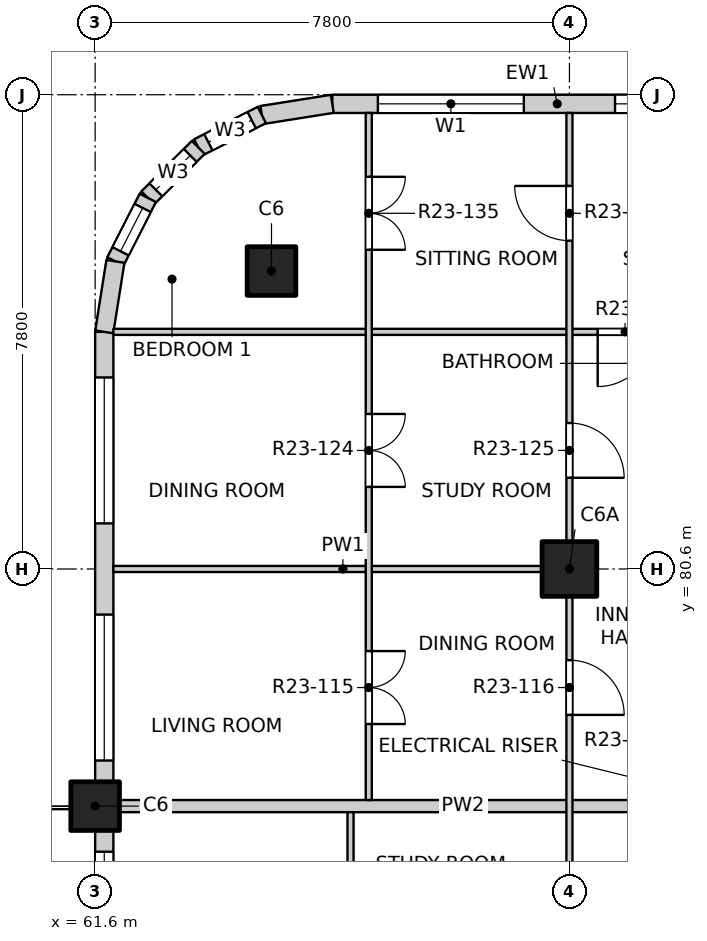
"""IFC4 building model, lengths in metres.
Left out: names, types, materials, properties, quantities, classifications, styles, units other than length and angle.
Written with IfcOpenShell. Run it as: python <this file> out.ifc"""

import sys

from ifc_helpers import new_model, si_unit, direction, frame, frame_2d, origin, origin_2d, place, context, subcontext, project, spatial, rectangle, extrude, element, fill, save


model = new_model("IFC4")
c1 = context("Model", 3, precision=1e-05, world=origin(), true_north=direction((0.0, 1.0)))
c2 = subcontext(c1, "Body", "Model", "MODEL_VIEW")
j1 = project(units=[si_unit("LENGTHUNIT", "METRE"), si_unit("PLANEANGLEUNIT", "RADIAN")], contexts=[c1])
p1 = place(None, origin())
s1 = spatial("IfcSite", under=j1, at=p1, CompositionType="ELEMENT")
p2 = place(p1, origin())
s2 = spatial("IfcBuilding", under=s1, at=p2, CompositionType="ELEMENT")
p3 = place(p2, frame((0.0, 0.0, 238.1)))
s3 = spatial("IfcBuildingStorey", under=s2, at=p3, CompositionType="ELEMENT", Elevation=238.1)
for number, where, z_axis, x_axis in (
    (1, (64.5, 85.5, -0.25), (0.0, 0.0, 1.0), (1.0, 0.0, 0.0)),
    (2, (61.6, 76.7, -0.25), (0.0, 0.0, 1.0), (1.0, 0.0, 0.0)),
):
    element("IfcColumn", number, at=place(p3, frame(where, z_axis=z_axis, x_axis=x_axis)), inside=s3, PredefinedType="COLUMN", context=c2, shape_type="SweptSolid", body=[
        extrude(rectangle(XDim=0.8, YDim=0.8, at=origin_2d()), origin(), (0.0, 0.0, 1.0), 3.35),
    ])
p4 = place(p3, frame((69.4, 80.6, -0.25), z_axis=(0.0, 0.0, 1.0), x_axis=(1.0, 0.0, 0.0)))
e3 = element("IfcColumn", 3, at=p4, inside=s3, PredefinedType="COLUMN", context=c2, shape_type="SweptSolid", body=[
    extrude(rectangle(XDim=0.9, YDim=0.9, at=origin_2d()), origin(), (0.0, 0.0, 1.0), 3.35),
])
p5 = place(p3, frame((65.5, 88.25, 0.0), z_axis=(0.0, 0.0, 1.0), x_axis=(1.0, 0.0, 0.0)))
e4 = element("IfcWall", 4, at=p5, inside=s3, PredefinedType="SOLIDWALL", context=c2, shape_type="SweptSolid", body=[
    extrude(rectangle(XDim=7.4, YDim=0.3, at=frame_2d((3.7, 0.0))), origin(), (0.0, 0.0, 1.0), 3.1),
])
p6 = place(p5, frame((0.75, 0.0, 0.9)))
e5 = element("IfcOpeningElement", 5, at=p6, cuts=e4, PredefinedType="OPENING", context=c2, shape_type="SweptSolid", body=[
    extrude(rectangle(XDim=2.4, YDim=1.8, at=frame_2d((1.2, 0.9))), frame((0.0, 0.16, 0.0), z_axis=(0.0, -1.0, 0.0), x_axis=(1.0, 0.0, 0.0)), (0.0, 0.0, 1.0), 0.32),
])
p7 = place(p5, frame((4.65, 0.0, 0.9)))
e6 = element("IfcOpeningElement", 6, at=p7, cuts=e4, PredefinedType="OPENING", context=c2, shape_type="SweptSolid", body=[
    extrude(rectangle(XDim=2.4, YDim=1.8, at=frame_2d((1.2, 0.9))), frame((0.0, 0.16, 0.0), z_axis=(0.0, -1.0, 0.0), x_axis=(1.0, 0.0, 0.0)), (0.0, 0.0, 1.0), 0.32),
])
p8 = place(p3, frame((61.75, 69.3, 0.0), z_axis=(0.0, 0.0, 1.0), x_axis=(0.0, 1.0, 0.0)))
e7 = element("IfcWall", 7, at=p8, inside=s3, PredefinedType="SOLIDWALL", context=c2, shape_type="SweptSolid", body=[
    extrude(rectangle(XDim=7.0, YDim=0.3, at=frame_2d((3.5, 0.0))), origin(), (0.0, 0.0, 1.0), 3.1),
])
p9 = place(p8, frame((0.65, 0.0, 0.0)))
e8 = element("IfcOpeningElement", 8, at=p9, cuts=e7, PredefinedType="OPENING", context=c2, shape_type="SweptSolid", body=[
    extrude(rectangle(XDim=1.8, YDim=2.4, at=frame_2d((0.9, 1.2))), frame((0.0, 0.16, 0.0), z_axis=(0.0, -1.0, 0.0), x_axis=(1.0, 0.0, 0.0)), (0.0, 0.0, 1.0), 0.32),
])
p10 = place(p8, frame((4.25, 0.0, 0.9)))
e9 = element("IfcOpeningElement", 9, at=p10, cuts=e7, PredefinedType="OPENING", context=c2, shape_type="SweptSolid", body=[
    extrude(rectangle(XDim=2.4, YDim=1.8, at=frame_2d((1.2, 0.9))), frame((0.0, 0.16, 0.0), z_axis=(0.0, -1.0, 0.0), x_axis=(1.0, 0.0, 0.0)), (0.0, 0.0, 1.0), 0.32),
])
p11 = place(p3, frame((61.75, 77.1, 0.0), z_axis=(0.0, 0.0, 1.0), x_axis=(0.0, 1.0, 0.0)))
e10 = element("IfcWall", 10, at=p11, inside=s3, PredefinedType="SOLIDWALL", context=c2, shape_type="SweptSolid", body=[
    extrude(rectangle(XDim=7.4, YDim=0.3, at=frame_2d((3.7, 0.0))), origin(), (0.0, 0.0, 1.0), 3.1),
])
p12 = place(p11, frame((0.35, 0.0, 0.9)))
e11 = element("IfcOpeningElement", 11, at=p12, cuts=e10, PredefinedType="OPENING", context=c2, shape_type="SweptSolid", body=[
    extrude(rectangle(XDim=2.4, YDim=1.8, at=frame_2d((1.2, 0.9))), frame((0.0, 0.16, 0.0), z_axis=(0.0, -1.0, 0.0), x_axis=(1.0, 0.0, 0.0)), (0.0, 0.0, 1.0), 0.32),
])
p13 = place(p11, frame((4.25, 0.0, 0.9)))
e12 = element("IfcOpeningElement", 12, at=p13, cuts=e10, PredefinedType="OPENING", context=c2, shape_type="SweptSolid", body=[
    extrude(rectangle(XDim=2.4, YDim=1.8, at=frame_2d((1.2, 0.9))), frame((0.0, 0.16, 0.0), z_axis=(0.0, -1.0, 0.0), x_axis=(1.0, 0.0, 0.0)), (0.0, 0.0, 1.0), 0.32),
])
p14 = place(p3, frame((65.5, 88.25, 0.0), z_axis=(0.0, 0.0, 1.0), x_axis=(-0.987678452879, -0.156496880861, 0.0)))
e13 = element("IfcWall", 13, at=p14, inside=s3, PredefinedType="SOLIDWALL", context=c2, shape_type="SweptSolid", body=[
    extrude(rectangle(XDim=1.173, YDim=0.3, at=frame_2d((0.586, 0.0))), origin(), (0.0, 0.0, 1.0), 3.1),
])
p15 = place(p3, frame((64.341, 88.066, 0.0), z_axis=(0.0, 0.0, 1.0), x_axis=(-0.890988677504, -0.454025524128, 0.0)))
e14 = element("IfcWall", 14, at=p15, inside=s3, PredefinedType="SOLIDWALL", context=c2, shape_type="SweptSolid", body=[
    extrude(rectangle(XDim=1.173, YDim=0.3, at=frame_2d((0.587, 0.0))), origin(), (0.0, 0.0, 1.0), 3.1),
])
p16 = place(p15, frame((0.187, 0.0, 0.9)))
e15 = element("IfcOpeningElement", 15, at=p16, cuts=e14, PredefinedType="OPENING", context=c2, shape_type="SweptSolid", body=[
    extrude(rectangle(XDim=0.8, YDim=1.2, at=frame_2d((0.4, 0.6))), frame((0.0, 0.16, 0.0), z_axis=(0.0, -1.0, 0.0), x_axis=(1.0, 0.0, 0.0)), (0.0, 0.0, 1.0), 0.32),
])
p17 = place(p3, frame((63.296, 87.534, 0.0), z_axis=(0.0, 0.0, 1.0), x_axis=(-0.707106781187, -0.707106781187, 0.0)))
e16 = element("IfcWall", 16, at=p17, inside=s3, PredefinedType="SOLIDWALL", context=c2, shape_type="SweptSolid", body=[
    extrude(rectangle(XDim=1.173, YDim=0.3, at=frame_2d((0.586, 0.0))), origin(), (0.0, 0.0, 1.0), 3.1),
])
p18 = place(p17, frame((0.187, 0.0, 0.9)))
e17 = element("IfcOpeningElement", 17, at=p18, cuts=e16, PredefinedType="OPENING", context=c2, shape_type="SweptSolid", body=[
    extrude(rectangle(XDim=0.8, YDim=1.2, at=frame_2d((0.4, 0.6))), frame((0.0, 0.16, 0.0), z_axis=(0.0, -1.0, 0.0), x_axis=(1.0, 0.0, 0.0)), (0.0, 0.0, 1.0), 0.32),
])
p19 = place(p3, frame((62.466, 86.704, 0.0), z_axis=(0.0, 0.0, 1.0), x_axis=(-0.454025524128, -0.890988677504, 0.0)))
e18 = element("IfcWall", 18, at=p19, inside=s3, PredefinedType="SOLIDWALL", context=c2, shape_type="SweptSolid", body=[
    extrude(rectangle(XDim=1.173, YDim=0.3, at=frame_2d((0.587, 0.0))), origin(), (0.0, 0.0, 1.0), 3.1),
])
p20 = place(p19, frame((0.187, 0.0, 0.9)))
e19 = element("IfcOpeningElement", 19, at=p20, cuts=e18, PredefinedType="OPENING", context=c2, shape_type="SweptSolid", body=[
    extrude(rectangle(XDim=0.8, YDim=1.2, at=frame_2d((0.4, 0.6))), frame((0.0, 0.16, 0.0), z_axis=(0.0, -1.0, 0.0), x_axis=(1.0, 0.0, 0.0)), (0.0, 0.0, 1.0), 0.32),
])
p21 = place(p3, frame((61.934, 85.659, 0.0), z_axis=(0.0, 0.0, 1.0), x_axis=(-0.156496880861, -0.987678452879, 0.0)))
e20 = element("IfcWall", 20, at=p21, inside=s3, PredefinedType="SOLIDWALL", context=c2, shape_type="SweptSolid", body=[
    extrude(rectangle(XDim=1.173, YDim=0.3, at=frame_2d((0.586, 0.0))), origin(), (0.0, 0.0, 1.0), 3.1),
])
p22 = place(p3, frame((61.9, 76.7, 0.0), z_axis=(0.0, 0.0, 1.0), x_axis=(1.0, 0.0, 0.0)))
e21 = element("IfcWall", 21, at=p22, inside=s3, PredefinedType="PARTITIONING", context=c2, shape_type="SweptSolid", body=[
    extrude(rectangle(XDim=11.5, YDim=0.2, at=frame_2d((5.75, 0.0))), origin(), (0.0, 0.0, 1.0), 3.1),
])
p23 = place(p3, frame((61.9, 80.6, 0.0), z_axis=(0.0, 0.0, 1.0), x_axis=(1.0, 0.0, 0.0)))
e22 = element("IfcWall", 22, at=p23, inside=s3, PredefinedType="PARTITIONING", context=c2, shape_type="SweptSolid", body=[
    extrude(rectangle(XDim=7.55, YDim=0.1, at=frame_2d((3.775, 0.0))), origin(), (0.0, 0.0, 1.0), 3.1),
])
p24 = place(p3, frame((61.9, 84.5, 0.0), z_axis=(0.0, 0.0, 1.0), x_axis=(1.0, 0.0, 0.0)))
e23 = element("IfcWall", 23, at=p24, inside=s3, PredefinedType="PARTITIONING", context=c2, shape_type="SweptSolid", body=[
    extrude(rectangle(XDim=11.5, YDim=0.1, at=frame_2d((5.75, 0.0))), origin(), (0.0, 0.0, 1.0), 3.1),
])
p25 = place(p24, frame((7.965, 0.0, 0.0)))
e24 = element("IfcOpeningElement", 24, at=p25, cuts=e23, PredefinedType="OPENING", context=c2, shape_type="SweptSolid", body=[
    extrude(rectangle(XDim=0.9, YDim=2.1, at=frame_2d((0.45, 1.05))), frame((0.0, 0.06, 0.0), z_axis=(0.0, -1.0, 0.0), x_axis=(1.0, 0.0, 0.0)), (0.0, 0.0, 1.0), 0.12),
])
p26 = place(p3, frame((65.8, 61.2, 0.0), z_axis=(0.0, 0.0, 1.0), x_axis=(0.0, 1.0, 0.0)))
e25 = element("IfcWall", 25, at=p26, inside=s3, PredefinedType="PARTITIONING", context=c2, shape_type="SweptSolid", body=[
    extrude(rectangle(XDim=15.4, YDim=0.1, at=frame_2d((7.7, 0.0))), origin(), (0.0, 0.0, 1.0), 3.1),
])
p27 = place(p26, frame((0.425, 0.0, 0.0)))
e26 = element("IfcOpeningElement", 26, at=p27, cuts=e25, PredefinedType="OPENING", context=c2, shape_type="SweptSolid", body=[
    extrude(rectangle(XDim=0.9, YDim=2.1, at=frame_2d((0.45, 1.05))), frame((0.0, 0.06, 0.0), z_axis=(0.0, -1.0, 0.0), x_axis=(1.0, 0.0, 0.0)), (0.0, 0.0, 1.0), 0.12),
])
p28 = place(p26, frame((2.375, 0.0, 0.0)))
e27 = element("IfcOpeningElement", 27, at=p28, cuts=e25, PredefinedType="OPENING", context=c2, shape_type="SweptSolid", body=[
    extrude(rectangle(XDim=0.9, YDim=2.1, at=frame_2d((0.45, 1.05))), frame((0.0, 0.06, 0.0), z_axis=(0.0, -1.0, 0.0), x_axis=(1.0, 0.0, 0.0)), (0.0, 0.0, 1.0), 0.12),
])
p29 = place(p26, frame((4.325, 0.0, 0.0)))
e28 = element("IfcOpeningElement", 28, at=p29, cuts=e25, PredefinedType="OPENING", context=c2, shape_type="SweptSolid", body=[
    extrude(rectangle(XDim=0.9, YDim=2.1, at=frame_2d((0.45, 1.05))), frame((0.0, 0.06, 0.0), z_axis=(0.0, -1.0, 0.0), x_axis=(1.0, 0.0, 0.0)), (0.0, 0.0, 1.0), 0.12),
])
p30 = place(p26, frame((6.275, 0.0, 0.0)))
e29 = element("IfcOpeningElement", 29, at=p30, cuts=e25, PredefinedType="OPENING", context=c2, shape_type="SweptSolid", body=[
    extrude(rectangle(XDim=0.9, YDim=2.1, at=frame_2d((0.45, 1.05))), frame((0.0, 0.06, 0.0), z_axis=(0.0, -1.0, 0.0), x_axis=(1.0, 0.0, 0.0)), (0.0, 0.0, 1.0), 0.12),
])
p31 = place(p26, frame((9.05, 0.0, 0.0)))
e30 = element("IfcOpeningElement", 30, at=p31, cuts=e25, PredefinedType="OPENING", context=c2, shape_type="SweptSolid", body=[
    extrude(rectangle(XDim=1.2, YDim=2.1, at=frame_2d((0.6, 1.05))), frame((0.0, 0.06, 0.0), z_axis=(0.0, -1.0, 0.0), x_axis=(1.0, 0.0, 0.0)), (0.0, 0.0, 1.0), 0.12),
])
p32 = place(p26, frame((12.95, 0.0, 0.0)))
e31 = element("IfcOpeningElement", 31, at=p32, cuts=e25, PredefinedType="OPENING", context=c2, shape_type="SweptSolid", body=[
    extrude(rectangle(XDim=1.2, YDim=2.1, at=frame_2d((0.6, 1.05))), frame((0.0, 0.06, 0.0), z_axis=(0.0, -1.0, 0.0), x_axis=(1.0, 0.0, 0.0)), (0.0, 0.0, 1.0), 0.12),
])
p33 = place(p3, frame((66.1, 76.8, 0.0), z_axis=(0.0, 0.0, 1.0), x_axis=(0.0, 1.0, 0.0)))
e32 = element("IfcWall", 32, at=p33, inside=s3, PredefinedType="PARTITIONING", context=c2, shape_type="SweptSolid", body=[
    extrude(rectangle(XDim=11.3, YDim=0.1, at=frame_2d((5.65, 0.0))), origin(), (0.0, 0.0, 1.0), 3.1),
])
p34 = place(p33, frame((1.25, 0.0, 0.0)))
e33 = element("IfcOpeningElement", 33, at=p34, cuts=e32, PredefinedType="OPENING", context=c2, shape_type="SweptSolid", body=[
    extrude(rectangle(XDim=1.2, YDim=2.1, at=frame_2d((0.6, 1.05))), frame((0.0, 0.06, 0.0), z_axis=(0.0, -1.0, 0.0), x_axis=(1.0, 0.0, 0.0)), (0.0, 0.0, 1.0), 0.12),
])
p35 = place(p33, frame((5.15, 0.0, 0.0)))
e34 = element("IfcOpeningElement", 34, at=p35, cuts=e32, PredefinedType="OPENING", context=c2, shape_type="SweptSolid", body=[
    extrude(rectangle(XDim=1.2, YDim=2.1, at=frame_2d((0.6, 1.05))), frame((0.0, 0.06, 0.0), z_axis=(0.0, -1.0, 0.0), x_axis=(1.0, 0.0, 0.0)), (0.0, 0.0, 1.0), 0.12),
])
p36 = place(p33, frame((9.05, 0.0, 0.0)))
e35 = element("IfcOpeningElement", 35, at=p36, cuts=e32, PredefinedType="OPENING", context=c2, shape_type="SweptSolid", body=[
    extrude(rectangle(XDim=1.2, YDim=2.1, at=frame_2d((0.6, 1.05))), frame((0.0, 0.06, 0.0), z_axis=(0.0, -1.0, 0.0), x_axis=(1.0, 0.0, 0.0)), (0.0, 0.0, 1.0), 0.12),
])
p37 = place(p3, frame((69.4, 41.9, 0.0), z_axis=(0.0, 0.0, 1.0), x_axis=(0.0, 1.0, 0.0)))
e36 = element("IfcWall", 36, at=p37, inside=s3, PredefinedType="PARTITIONING", context=c2, shape_type="SweptSolid", body=[
    extrude(rectangle(XDim=46.2, YDim=0.1, at=frame_2d((23.1, 0.0))), origin(), (0.0, 0.0, 1.0), 3.1),
])
p38 = place(p37, frame((1.2, 0.0, 0.0)))
e37 = element("IfcOpeningElement", 37, at=p38, cuts=e36, PredefinedType="OPENING", context=c2, shape_type="SweptSolid", body=[
    extrude(rectangle(XDim=0.9, YDim=2.1, at=frame_2d((0.45, 1.05))), frame((0.0, 0.06, 0.0), z_axis=(0.0, -1.0, 0.0), x_axis=(1.0, 0.0, 0.0)), (0.0, 0.0, 1.0), 0.12),
])
p39 = place(p37, frame((6.025, 0.0, 0.0)))
e38 = element("IfcOpeningElement", 38, at=p39, cuts=e36, PredefinedType="OPENING", context=c2, shape_type="SweptSolid", body=[
    extrude(rectangle(XDim=0.9, YDim=2.1, at=frame_2d((0.45, 1.05))), frame((0.0, 0.06, 0.0), z_axis=(0.0, -1.0, 0.0), x_axis=(1.0, 0.0, 0.0)), (0.0, 0.0, 1.0), 0.12),
])
p40 = place(p37, frame((9.975, 0.0, 0.0)))
e39 = element("IfcOpeningElement", 39, at=p40, cuts=e36, PredefinedType="OPENING", context=c2, shape_type="SweptSolid", body=[
    extrude(rectangle(XDim=0.9, YDim=2.1, at=frame_2d((0.45, 1.05))), frame((0.0, 0.06, 0.0), z_axis=(0.0, -1.0, 0.0), x_axis=(1.0, 0.0, 0.0)), (0.0, 0.0, 1.0), 0.12),
])
p41 = place(p37, frame((12.9, 0.0, 0.0)))
e40 = element("IfcOpeningElement", 40, at=p41, cuts=e36, PredefinedType="OPENING", context=c2, shape_type="SweptSolid", body=[
    extrude(rectangle(XDim=0.9, YDim=2.1, at=frame_2d((0.45, 1.05))), frame((0.0, 0.06, 0.0), z_axis=(0.0, -1.0, 0.0), x_axis=(1.0, 0.0, 0.0)), (0.0, 0.0, 1.0), 0.12),
])
p42 = place(p37, frame((17.775, 0.0, 0.0)))
e41 = element("IfcOpeningElement", 41, at=p42, cuts=e36, PredefinedType="OPENING", context=c2, shape_type="SweptSolid", body=[
    extrude(rectangle(XDim=0.9, YDim=2.1, at=frame_2d((0.45, 1.05))), frame((0.0, 0.06, 0.0), z_axis=(0.0, -1.0, 0.0), x_axis=(1.0, 0.0, 0.0)), (0.0, 0.0, 1.0), 0.12),
])
p43 = place(p37, frame((21.625, 0.0, 0.0)))
e42 = element("IfcOpeningElement", 42, at=p43, cuts=e36, PredefinedType="OPENING", context=c2, shape_type="SweptSolid", body=[
    extrude(rectangle(XDim=0.9, YDim=2.1, at=frame_2d((0.45, 1.05))), frame((0.0, 0.06, 0.0), z_axis=(0.0, -1.0, 0.0), x_axis=(1.0, 0.0, 0.0)), (0.0, 0.0, 1.0), 0.12),
])
p44 = place(p37, frame((25.575, 0.0, 0.0)))
e43 = element("IfcOpeningElement", 43, at=p44, cuts=e36, PredefinedType="OPENING", context=c2, shape_type="SweptSolid", body=[
    extrude(rectangle(XDim=0.9, YDim=2.1, at=frame_2d((0.45, 1.05))), frame((0.0, 0.06, 0.0), z_axis=(0.0, -1.0, 0.0), x_axis=(1.0, 0.0, 0.0)), (0.0, 0.0, 1.0), 0.12),
])
p45 = place(p37, frame((28.5, 0.0, 0.0)))
e44 = element("IfcOpeningElement", 44, at=p45, cuts=e36, PredefinedType="OPENING", context=c2, shape_type="SweptSolid", body=[
    extrude(rectangle(XDim=0.9, YDim=2.1, at=frame_2d((0.45, 1.05))), frame((0.0, 0.06, 0.0), z_axis=(0.0, -1.0, 0.0), x_axis=(1.0, 0.0, 0.0)), (0.0, 0.0, 1.0), 0.12),
])
p46 = place(p37, frame((32.4, 0.0, 0.0)))
e45 = element("IfcOpeningElement", 45, at=p46, cuts=e36, PredefinedType="OPENING", context=c2, shape_type="SweptSolid", body=[
    extrude(rectangle(XDim=0.9, YDim=2.1, at=frame_2d((0.45, 1.05))), frame((0.0, 0.06, 0.0), z_axis=(0.0, -1.0, 0.0), x_axis=(1.0, 0.0, 0.0)), (0.0, 0.0, 1.0), 0.12),
])
p47 = place(p37, frame((36.3, 0.0, 0.0)))
e46 = element("IfcOpeningElement", 46, at=p47, cuts=e36, PredefinedType="OPENING", context=c2, shape_type="SweptSolid", body=[
    extrude(rectangle(XDim=0.9, YDim=2.1, at=frame_2d((0.45, 1.05))), frame((0.0, 0.06, 0.0), z_axis=(0.0, -1.0, 0.0), x_axis=(1.0, 0.0, 0.0)), (0.0, 0.0, 1.0), 0.12),
])
p48 = place(p37, frame((40.2, 0.0, 0.0)))
e47 = element("IfcOpeningElement", 47, at=p48, cuts=e36, PredefinedType="OPENING", context=c2, shape_type="SweptSolid", body=[
    extrude(rectangle(XDim=0.9, YDim=2.1, at=frame_2d((0.45, 1.05))), frame((0.0, 0.06, 0.0), z_axis=(0.0, -1.0, 0.0), x_axis=(1.0, 0.0, 0.0)), (0.0, 0.0, 1.0), 0.12),
])
p49 = place(p37, frame((44.1, 0.0, 0.0)))
e48 = element("IfcOpeningElement", 48, at=p49, cuts=e36, PredefinedType="OPENING", context=c2, shape_type="SweptSolid", body=[
    extrude(rectangle(XDim=0.9, YDim=2.1, at=frame_2d((0.45, 1.05))), frame((0.0, 0.06, 0.0), z_axis=(0.0, -1.0, 0.0), x_axis=(1.0, 0.0, 0.0)), (0.0, 0.0, 1.0), 0.12),
])
p50 = place(p6, origin())
e49 = element("IfcWindow", 49, at=p50, inside=s3, PartitioningType="DOUBLE_PANEL_VERTICAL", PredefinedType="WINDOW", context=c2, shape_type="SweptSolid", body=[
    extrude(rectangle(XDim=2.4, YDim=1.8, at=frame_2d((1.2, 0.9))), frame((0.0, 0.03, 0.0), z_axis=(0.0, -1.0, 0.0), x_axis=(1.0, 0.0, 0.0)), (0.0, 0.0, 1.0), 0.06),
])
fill(e5, e49)
p51 = place(p7, origin())
e50 = element("IfcWindow", 50, at=p51, inside=s3, PartitioningType="DOUBLE_PANEL_VERTICAL", PredefinedType="WINDOW", context=c2, shape_type="SweptSolid", body=[
    extrude(rectangle(XDim=2.4, YDim=1.8, at=frame_2d((1.2, 0.9))), frame((0.0, 0.03, 0.0), z_axis=(0.0, -1.0, 0.0), x_axis=(1.0, 0.0, 0.0)), (0.0, 0.0, 1.0), 0.06),
])
fill(e6, e50)
p52 = place(p10, origin())
e51 = element("IfcWindow", 51, at=p52, inside=s3, PartitioningType="DOUBLE_PANEL_VERTICAL", PredefinedType="WINDOW", context=c2, shape_type="SweptSolid", body=[
    extrude(rectangle(XDim=2.4, YDim=1.8, at=frame_2d((1.2, 0.9))), frame((0.0, 0.03, 0.0), z_axis=(0.0, -1.0, 0.0), x_axis=(1.0, 0.0, 0.0)), (0.0, 0.0, 1.0), 0.06),
])
fill(e9, e51)
p53 = place(p12, origin())
e52 = element("IfcWindow", 52, at=p53, inside=s3, PartitioningType="DOUBLE_PANEL_VERTICAL", PredefinedType="WINDOW", context=c2, shape_type="SweptSolid", body=[
    extrude(rectangle(XDim=2.4, YDim=1.8, at=frame_2d((1.2, 0.9))), frame((0.0, 0.03, 0.0), z_axis=(0.0, -1.0, 0.0), x_axis=(1.0, 0.0, 0.0)), (0.0, 0.0, 1.0), 0.06),
])
fill(e11, e52)
p54 = place(p13, origin())
e53 = element("IfcWindow", 53, at=p54, inside=s3, PartitioningType="DOUBLE_PANEL_VERTICAL", PredefinedType="WINDOW", context=c2, shape_type="SweptSolid", body=[
    extrude(rectangle(XDim=2.4, YDim=1.8, at=frame_2d((1.2, 0.9))), frame((0.0, 0.03, 0.0), z_axis=(0.0, -1.0, 0.0), x_axis=(1.0, 0.0, 0.0)), (0.0, 0.0, 1.0), 0.06),
])
fill(e12, e53)
p55 = place(p16, origin())
e54 = element("IfcWindow", 54, at=p55, inside=s3, PartitioningType="SINGLE_PANEL", PredefinedType="WINDOW", context=c2, shape_type="SweptSolid", body=[
    extrude(rectangle(XDim=0.8, YDim=1.2, at=frame_2d((0.4, 0.6))), frame((0.0, 0.03, 0.0), z_axis=(0.0, -1.0, 0.0), x_axis=(1.0, 0.0, 0.0)), (0.0, 0.0, 1.0), 0.06),
])
fill(e15, e54)
p56 = place(p18, origin())
e55 = element("IfcWindow", 55, at=p56, inside=s3, PartitioningType="SINGLE_PANEL", PredefinedType="WINDOW", context=c2, shape_type="SweptSolid", body=[
    extrude(rectangle(XDim=0.8, YDim=1.2, at=frame_2d((0.4, 0.6))), frame((0.0, 0.03, 0.0), z_axis=(0.0, -1.0, 0.0), x_axis=(1.0, 0.0, 0.0)), (0.0, 0.0, 1.0), 0.06),
])
fill(e17, e55)
p57 = place(p20, origin())
e56 = element("IfcWindow", 56, at=p57, inside=s3, PartitioningType="SINGLE_PANEL", PredefinedType="WINDOW", context=c2, shape_type="SweptSolid", body=[
    extrude(rectangle(XDim=0.8, YDim=1.2, at=frame_2d((0.4, 0.6))), frame((0.0, 0.03, 0.0), z_axis=(0.0, -1.0, 0.0), x_axis=(1.0, 0.0, 0.0)), (0.0, 0.0, 1.0), 0.06),
])
fill(e19, e56)
p58 = place(p34, origin())
e57 = element("IfcDoor", 57, at=p58, inside=s3, OperationType="DOUBLE_DOOR_SINGLE_SWING", PredefinedType="DOOR", context=c2, shape_type="SweptSolid", body=[
    extrude(rectangle(XDim=1.2, YDim=2.1, at=frame_2d((0.6, 1.05))), frame((0.0, 0.025, 0.0), z_axis=(0.0, -1.0, 0.0), x_axis=(1.0, 0.0, 0.0)), (0.0, 0.0, 1.0), 0.05),
])
fill(e33, e57)
p59 = place(p47, origin())
e58 = element("IfcDoor", 58, at=p59, inside=s3, OperationType="SINGLE_SWING_RIGHT", PredefinedType="DOOR", context=c2, shape_type="SweptSolid", body=[
    extrude(rectangle(XDim=0.9, YDim=2.1, at=frame_2d((0.45, 1.05))), frame((0.0, 0.025, 0.0), z_axis=(0.0, -1.0, 0.0), x_axis=(1.0, 0.0, 0.0)), (0.0, 0.0, 1.0), 0.05),
])
fill(e46, e58)
p60 = place(p35, origin())
e59 = element("IfcDoor", 59, at=p60, inside=s3, OperationType="DOUBLE_DOOR_SINGLE_SWING", PredefinedType="DOOR", context=c2, shape_type="SweptSolid", body=[
    extrude(rectangle(XDim=1.2, YDim=2.1, at=frame_2d((0.6, 1.05))), frame((0.0, 0.025, 0.0), z_axis=(0.0, -1.0, 0.0), x_axis=(1.0, 0.0, 0.0)), (0.0, 0.0, 1.0), 0.05),
])
fill(e34, e59)
p61 = place(p48, origin())
e60 = element("IfcDoor", 60, at=p61, inside=s3, OperationType="SINGLE_SWING_RIGHT", PredefinedType="DOOR", context=c2, shape_type="SweptSolid", body=[
    extrude(rectangle(XDim=0.9, YDim=2.1, at=frame_2d((0.45, 1.05))), frame((0.0, 0.025, 0.0), z_axis=(0.0, -1.0, 0.0), x_axis=(1.0, 0.0, 0.0)), (0.0, 0.0, 1.0), 0.05),
])
fill(e47, e60)
p62 = place(p25, origin())
e61 = element("IfcDoor", 61, at=p62, inside=s3, OperationType="SINGLE_SWING_RIGHT", PredefinedType="DOOR", context=c2, shape_type="SweptSolid", body=[
    extrude(rectangle(XDim=0.9, YDim=2.1, at=frame_2d((0.45, 1.05))), frame((0.0, 0.025, 0.0), z_axis=(0.0, -1.0, 0.0), x_axis=(1.0, 0.0, 0.0)), (0.0, 0.0, 1.0), 0.05),
])
fill(e24, e61)
p63 = place(p36, origin())
e62 = element("IfcDoor", 62, at=p63, inside=s3, OperationType="DOUBLE_DOOR_SINGLE_SWING", PredefinedType="DOOR", context=c2, shape_type="SweptSolid", body=[
    extrude(rectangle(XDim=1.2, YDim=2.1, at=frame_2d((0.6, 1.05))), frame((0.0, 0.025, 0.0), z_axis=(0.0, -1.0, 0.0), x_axis=(1.0, 0.0, 0.0)), (0.0, 0.0, 1.0), 0.05),
])
fill(e35, e62)
p64 = place(p49, origin())
e63 = element("IfcDoor", 63, at=p64, inside=s3, OperationType="SINGLE_SWING_RIGHT", PredefinedType="DOOR", context=c2, shape_type="SweptSolid", body=[
    extrude(rectangle(XDim=0.9, YDim=2.1, at=frame_2d((0.45, 1.05))), frame((0.0, 0.025, 0.0), z_axis=(0.0, -1.0, 0.0), x_axis=(1.0, 0.0, 0.0)), (0.0, 0.0, 1.0), 0.05),
])
fill(e48, e63)
save(model, sys.argv[1])
